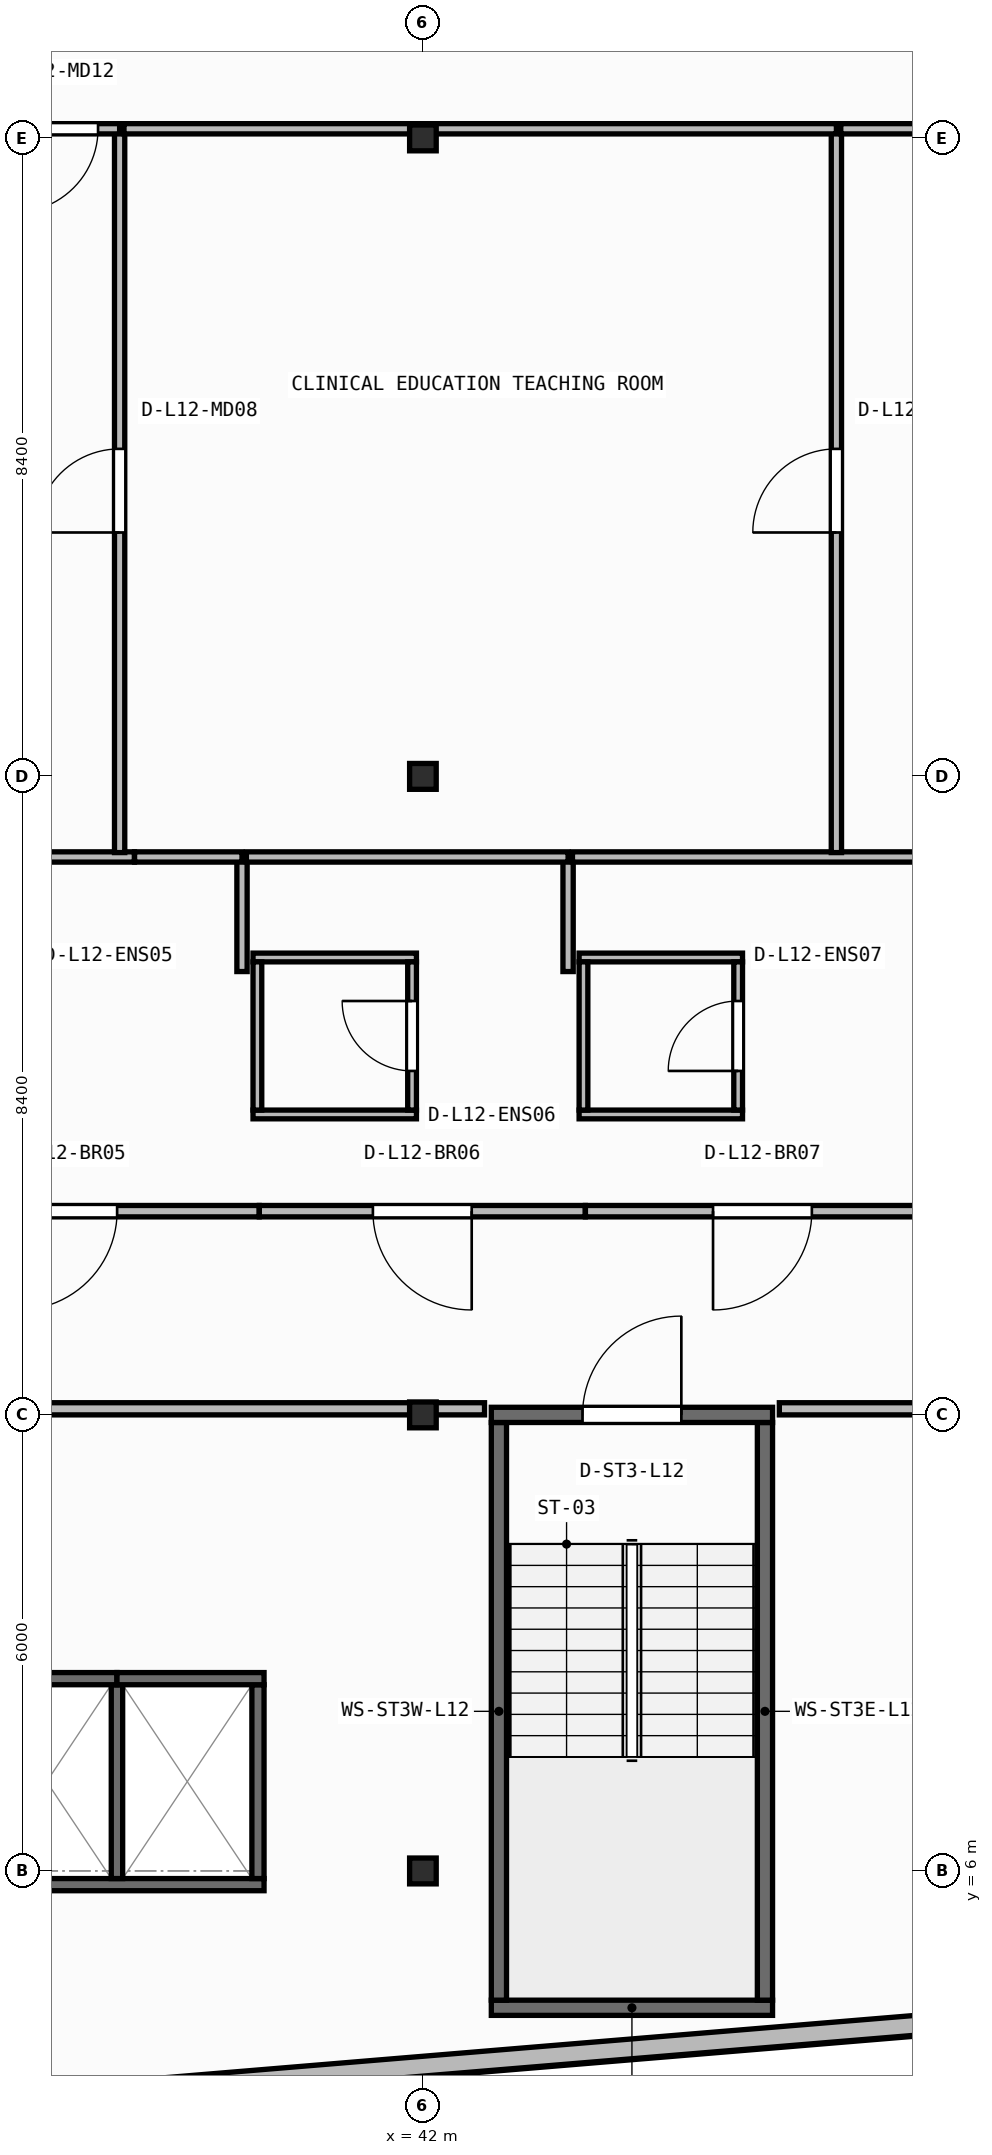
"""IFC4 building model, lengths in metres.
Left out: names, types, materials, properties, quantities, classifications, styles, units other than length and angle.
Written with IfcOpenShell. Run it as: python <this file> out.ifc"""

import sys

from ifc_helpers import new_model, si_unit, direction, frame, frame_2d, origin, origin_2d, place, context, subcontext, project, spatial, rectangle, i_section, extrude, element, fill, save


model = new_model("IFC4")
c1 = context("Model", 3, precision=1e-05, world=origin(), true_north=direction((0.0, 1.0)))
c2 = subcontext(c1, "Body", "Model", "MODEL_VIEW")
j1 = project(units=[si_unit("LENGTHUNIT", "METRE"), si_unit("PLANEANGLEUNIT", "RADIAN")], contexts=[c1])
p1 = place(None, origin())
s1 = spatial("IfcSite", under=j1, at=p1, CompositionType="ELEMENT")
p2 = place(p1, origin())
s2 = spatial("IfcBuilding", under=s1, at=p2, CompositionType="ELEMENT")
p3 = place(p2, frame((0.0, 0.0, 50.15)))
s3 = spatial("IfcBuildingStorey", under=s2, at=p3, CompositionType="ELEMENT", Elevation=50.15)
for number, where, z_axis, x_axis in (
    (1, (42.0, 6.0, 0.0), (0.0, 0.0, 1.0), (1.0, 0.0, 0.0)),
    (2, (42.0, 12.0, 0.0), (0.0, 0.0, 1.0), (1.0, 0.0, 0.0)),
    (3, (42.0, 20.4, 0.0), (0.0, 0.0, 1.0), (1.0, 0.0, 0.0)),
    (4, (42.0, 28.8, 0.0), (0.0, 0.0, 1.0), (1.0, 0.0, 0.0)),
):
    element("IfcColumn", number, at=place(p3, frame(where, z_axis=z_axis, x_axis=x_axis)), inside=s3, PredefinedType="COLUMN", context=c2, shape_type="SweptSolid", body=[
        extrude(i_section(OverallWidth=0.35, OverallDepth=0.34, WebThickness=0.016, FlangeThickness=0.028, at=origin_2d()), origin(), (0.0, 0.0, 1.0), 3.95),
    ])
p4 = place(p3, frame((2.76, 0.174, 0.0), z_axis=(0.0, 0.0, 1.0), x_axis=(0.996571478456, 0.082736257641, 0.0)))
e5 = element("IfcWall", 5, at=p4, inside=s3, PredefinedType="STANDARD", context=c2, shape_type="SweptSolid", body=[
    extrude(rectangle(XDim=52.861, YDim=0.26, at=frame_2d((26.431, 0.0))), origin(), (0.0, 0.0, 1.0), 3.71),
])
p5 = place(p4, frame((25.231, 0.0, 0.9)))
e6 = element("IfcOpeningElement", 6, at=p5, cuts=e5, PredefinedType="OPENING", context=c2, shape_type="SweptSolid", body=[
    extrude(rectangle(XDim=2.4, YDim=1.65, at=frame_2d((1.2, 0.825))), frame((0.0, 0.14, 0.0), z_axis=(0.0, -1.0, 0.0), x_axis=(1.0, 0.0, 0.0)), (0.0, 0.0, 1.0), 0.28),
])
p6 = place(p3, frame((42.9, 4.2, 0.0), z_axis=(0.0, 0.0, 1.0), x_axis=(1.0, 0.0, 0.0)))
e7 = element("IfcWall", 7, at=p6, inside=s3, PredefinedType="SHEAR", context=c2, shape_type="SweptSolid", body=[
    extrude(rectangle(XDim=3.7, YDim=0.2, at=frame_2d((1.85, 0.0))), origin(), (0.0, 0.0, 1.0), 3.71),
])
for number, where, z_axis, x_axis in (
    (8, (43.0, 4.3, 0.0), (0.0, 0.0, 1.0), (0.0, 1.0, 0.0)),
    (9, (46.5, 4.3, 0.0), (0.0, 0.0, 1.0), (0.0, 1.0, 0.0)),
):
    element("IfcWall", number, at=place(p3, frame(where, z_axis=z_axis, x_axis=x_axis)), inside=s3, PredefinedType="SHEAR", context=c2, shape_type="SweptSolid", body=[
        extrude(rectangle(XDim=7.6, YDim=0.2, at=frame_2d((3.8, 0.0))), origin(), (0.0, 0.0, 1.0), 3.71),
    ])
p7 = place(p3, frame((42.9, 12.0, 0.0), z_axis=(0.0, 0.0, 1.0), x_axis=(1.0, 0.0, 0.0)))
e10 = element("IfcWall", 10, at=p7, inside=s3, PredefinedType="SHEAR", context=c2, shape_type="SweptSolid", body=[
    extrude(rectangle(XDim=3.7, YDim=0.2, at=frame_2d((1.85, 0.0))), origin(), (0.0, 0.0, 1.0), 3.71),
])
p8 = place(p7, frame((1.2, 0.0, 0.0)))
e11 = element("IfcOpeningElement", 11, at=p8, cuts=e10, PredefinedType="OPENING", context=c2, shape_type="SweptSolid", body=[
    extrude(rectangle(XDim=1.3, YDim=2.15, at=frame_2d((0.65, 1.075))), frame((0.0, 0.11, 0.0), z_axis=(0.0, -1.0, 0.0), x_axis=(1.0, 0.0, 0.0)), (0.0, 0.0, 1.0), 0.22),
])
p9 = place(p3, frame((34.19, 5.82, 0.0), z_axis=(0.0, 0.0, 1.0), x_axis=(1.0, 0.0, 0.0)))
e12 = element("IfcWall", 12, at=p9, inside=s3, PredefinedType="SHEAR", context=c2, shape_type="SweptSolid", body=[
    extrude(rectangle(XDim=5.72, YDim=0.16, at=frame_2d((2.86, 0.0))), origin(), (0.0, 0.0, 1.0), 3.71),
])
p10 = place(p3, frame((39.83, 5.9, 0.0), z_axis=(0.0, 0.0, 1.0), x_axis=(0.0, 1.0, 0.0)))
e13 = element("IfcWall", 13, at=p10, inside=s3, PredefinedType="SHEAR", context=c2, shape_type="SweptSolid", body=[
    extrude(rectangle(XDim=2.55, YDim=0.16, at=frame_2d((1.275, 0.0))), origin(), (0.0, 0.0, 1.0), 3.71),
])
p11 = place(p3, frame((37.975, 5.9, 0.0), z_axis=(0.0, 0.0, 1.0), x_axis=(0.0, 1.0, 0.0)))
e14 = element("IfcWall", 14, at=p11, inside=s3, PredefinedType="SHEAR", context=c2, shape_type="SweptSolid", body=[
    extrude(rectangle(XDim=2.55, YDim=0.15, at=frame_2d((1.275, 0.0))), origin(), (0.0, 0.0, 1.0), 3.71),
])
p12 = place(p3, frame((36.125, 8.53, 0.0), z_axis=(0.0, 0.0, 1.0), x_axis=(1.0, 0.0, 0.0)))
e15 = element("IfcWall", 15, at=p12, inside=s3, PredefinedType="SHEAR", context=c2, shape_type="SweptSolid", body=[
    extrude(rectangle(XDim=1.85, YDim=0.16, at=frame_2d((0.925, 0.0))), origin(), (0.0, 0.0, 1.0), 3.71),
])
p13 = place(p3, frame((37.975, 8.53, 0.0), z_axis=(0.0, 0.0, 1.0), x_axis=(1.0, 0.0, 0.0)))
e16 = element("IfcWall", 16, at=p13, inside=s3, PredefinedType="SHEAR", context=c2, shape_type="SweptSolid", body=[
    extrude(rectangle(XDim=1.935, YDim=0.16, at=frame_2d((0.967, 0.0))), origin(), (0.0, 0.0, 1.0), 3.71),
])
p14 = place(p3, frame((39.765, 15.952, 0.0), z_axis=(0.0, 0.0, 1.0), x_axis=(1.0, 0.0, 0.0)))
e17 = element("IfcWall", 17, at=p14, inside=s3, PredefinedType="PARTITIONING", context=c2, shape_type="SweptSolid", body=[
    extrude(rectangle(XDim=2.15, YDim=0.115, at=frame_2d((1.075, 0.0))), origin(), (0.0, 0.0, 1.0), 3.329),
])
p15 = place(p3, frame((39.765, 18.018, 0.0), z_axis=(0.0, 0.0, 1.0), x_axis=(1.0, 0.0, 0.0)))
e18 = element("IfcWall", 18, at=p15, inside=s3, PredefinedType="PARTITIONING", context=c2, shape_type="SweptSolid", body=[
    extrude(rectangle(XDim=2.15, YDim=0.115, at=frame_2d((1.075, 0.0))), origin(), (0.0, 0.0, 1.0), 3.71),
])
p16 = place(p3, frame((39.823, 16.01, 0.0), z_axis=(0.0, 0.0, 1.0), x_axis=(0.0, 1.0, 0.0)))
e19 = element("IfcWall", 19, at=p16, inside=s3, PredefinedType="PARTITIONING", context=c2, shape_type="SweptSolid", body=[
    extrude(rectangle(XDim=1.95, YDim=0.115, at=frame_2d((0.975, 0.0))), origin(), (0.0, 0.0, 1.0), 3.71),
])
p17 = place(p3, frame((41.857, 16.01, 0.0), z_axis=(0.0, 0.0, 1.0), x_axis=(0.0, 1.0, 0.0)))
e20 = element("IfcWall", 20, at=p17, inside=s3, PredefinedType="PARTITIONING", context=c2, shape_type="SweptSolid", body=[
    extrude(rectangle(XDim=1.95, YDim=0.115, at=frame_2d((0.975, 0.0))), origin(), (0.0, 0.0, 1.0), 3.073),
])
p18 = place(p17, frame((0.515, 0.0, 0.0)))
e21 = element("IfcOpeningElement", 21, at=p18, cuts=e20, PredefinedType="OPENING", context=c2, shape_type="SweptSolid", body=[
    extrude(rectangle(XDim=0.92, YDim=2.1, at=frame_2d((0.46, 1.05))), frame((0.0, 0.067, 0.0), z_axis=(0.0, -1.0, 0.0), x_axis=(1.0, 0.0, 0.0)), (0.0, 0.0, 1.0), 0.135),
])
p19 = place(p3, frame((44.055, 15.952, 0.0), z_axis=(0.0, 0.0, 1.0), x_axis=(1.0, 0.0, 0.0)))
e22 = element("IfcWall", 22, at=p19, inside=s3, PredefinedType="PARTITIONING", context=c2, shape_type="SweptSolid", body=[
    extrude(rectangle(XDim=2.15, YDim=0.115, at=frame_2d((1.075, 0.0))), origin(), (0.0, 0.0, 1.0), 3.329),
])
p20 = place(p3, frame((44.055, 18.018, 0.0), z_axis=(0.0, 0.0, 1.0), x_axis=(1.0, 0.0, 0.0)))
e23 = element("IfcWall", 23, at=p20, inside=s3, PredefinedType="PARTITIONING", context=c2, shape_type="SweptSolid", body=[
    extrude(rectangle(XDim=2.15, YDim=0.115, at=frame_2d((1.075, 0.0))), origin(), (0.0, 0.0, 1.0), 3.71),
])
p21 = place(p3, frame((44.113, 16.01, 0.0), z_axis=(0.0, 0.0, 1.0), x_axis=(0.0, 1.0, 0.0)))
e24 = element("IfcWall", 24, at=p21, inside=s3, PredefinedType="PARTITIONING", context=c2, shape_type="SweptSolid", body=[
    extrude(rectangle(XDim=1.95, YDim=0.115, at=frame_2d((0.975, 0.0))), origin(), (0.0, 0.0, 1.0), 3.71),
])
p22 = place(p3, frame((46.147, 16.01, 0.0), z_axis=(0.0, 0.0, 1.0), x_axis=(0.0, 1.0, 0.0)))
e25 = element("IfcWall", 25, at=p22, inside=s3, PredefinedType="PARTITIONING", context=c2, shape_type="SweptSolid", body=[
    extrude(rectangle(XDim=1.95, YDim=0.115, at=frame_2d((0.975, 0.0))), origin(), (0.0, 0.0, 1.0), 3.71),
])
p23 = place(p22, frame((0.515, 0.0, 0.0)))
e26 = element("IfcOpeningElement", 26, at=p23, cuts=e25, PredefinedType="OPENING", context=c2, shape_type="SweptSolid", body=[
    extrude(rectangle(XDim=0.92, YDim=2.1, at=frame_2d((0.46, 1.05))), frame((0.0, 0.067, 0.0), z_axis=(0.0, -1.0, 0.0), x_axis=(1.0, 0.0, 0.0)), (0.0, 0.0, 1.0), 0.135),
])
p24 = place(p3, frame((39.846, 14.68, 0.0), z_axis=(0.0, 0.0, 1.0), x_axis=(-1.0, 0.0, 0.0)))
e27 = element("IfcWall", 27, at=p24, inside=s3, PredefinedType="PARTITIONING", context=c2, shape_type="SweptSolid", body=[
    extrude(rectangle(XDim=5.038, YDim=0.15, at=frame_2d((2.519, 0.0))), origin(), (0.0, 0.0, 1.0), 3.71),
])
p25 = place(p24, frame((1.869, 0.0, 0.0)))
e28 = element("IfcOpeningElement", 28, at=p25, cuts=e27, PredefinedType="OPENING", context=c2, shape_type="SweptSolid", body=[
    extrude(rectangle(XDim=1.3, YDim=2.15, at=frame_2d((0.65, 1.075))), frame((0.0, 0.085, 0.0), z_axis=(0.0, -1.0, 0.0), x_axis=(1.0, 0.0, 0.0)), (0.0, 0.0, 1.0), 0.17),
])
p26 = place(p3, frame((44.136, 14.68, 0.0), z_axis=(0.0, 0.0, 1.0), x_axis=(-1.0, 0.0, 0.0)))
e29 = element("IfcWall", 29, at=p26, inside=s3, PredefinedType="PARTITIONING", context=c2, shape_type="SweptSolid", body=[
    extrude(rectangle(XDim=4.288, YDim=0.15, at=frame_2d((2.144, 0.0))), origin(), (0.0, 0.0, 1.0), 3.71),
])
p27 = place(p26, frame((1.494, 0.0, 0.0)))
e30 = element("IfcOpeningElement", 30, at=p27, cuts=e29, PredefinedType="OPENING", context=c2, shape_type="SweptSolid", body=[
    extrude(rectangle(XDim=1.3, YDim=2.15, at=frame_2d((0.65, 1.075))), frame((0.0, 0.085, 0.0), z_axis=(0.0, -1.0, 0.0), x_axis=(1.0, 0.0, 0.0)), (0.0, 0.0, 1.0), 0.17),
])
p28 = place(p3, frame((48.796, 14.68, 0.0), z_axis=(0.0, 0.0, 1.0), x_axis=(-1.0, 0.0, 0.0)))
e31 = element("IfcWall", 31, at=p28, inside=s3, PredefinedType="PARTITIONING", context=c2, shape_type="SweptSolid", body=[
    extrude(rectangle(XDim=4.658, YDim=0.15, at=frame_2d((2.329, 0.0))), origin(), (0.0, 0.0, 1.0), 3.71),
])
p29 = place(p28, frame((1.679, 0.0, 0.0)))
e32 = element("IfcOpeningElement", 32, at=p29, cuts=e31, PredefinedType="OPENING", context=c2, shape_type="SweptSolid", body=[
    extrude(rectangle(XDim=1.3, YDim=2.15, at=frame_2d((0.65, 1.075))), frame((0.0, 0.085, 0.0), z_axis=(0.0, -1.0, 0.0), x_axis=(1.0, 0.0, 0.0)), (0.0, 0.0, 1.0), 0.17),
])
p30 = place(p3, frame((39.62, 17.833, 0.0), z_axis=(0.0, 0.0, 1.0), x_axis=(0.0, 1.0, 0.0)))
e33 = element("IfcWall", 33, at=p30, inside=s3, PredefinedType="PARTITIONING", context=c2, shape_type="SweptSolid", body=[
    extrude(rectangle(XDim=1.508, YDim=0.135, at=frame_2d((0.754, 0.0))), origin(), (0.0, 0.0, 1.0), 3.71),
])
p31 = place(p3, frame((38.205, 19.34, 0.0), z_axis=(0.0, 0.0, 1.0), x_axis=(-1.0, 0.0, 0.0)))
e34 = element("IfcWall", 34, at=p31, inside=s3, PredefinedType="PARTITIONING", context=c2, shape_type="SweptSolid", body=[
    extrude(rectangle(XDim=3.567, YDim=0.135, at=frame_2d((1.784, 0.0))), origin(), (0.0, 0.0, 1.0), 3.71),
])
p32 = place(p3, frame((39.62, 19.34, 0.0), z_axis=(0.0, 0.0, 1.0), x_axis=(-1.0, 0.0, 0.0)))
e35 = element("IfcWall", 35, at=p32, inside=s3, PredefinedType="PARTITIONING", context=c2, shape_type="SweptSolid", body=[
    extrude(rectangle(XDim=1.414, YDim=0.135, at=frame_2d((0.707, 0.0))), origin(), (0.0, 0.0, 1.0), 3.71),
])
p33 = place(p3, frame((43.91, 17.833, 0.0), z_axis=(0.0, 0.0, 1.0), x_axis=(0.0, 1.0, 0.0)))
e36 = element("IfcWall", 36, at=p33, inside=s3, PredefinedType="PARTITIONING", context=c2, shape_type="SweptSolid", body=[
    extrude(rectangle(XDim=1.508, YDim=0.135, at=frame_2d((0.754, 0.0))), origin(), (0.0, 0.0, 1.0), 3.71),
])
p34 = place(p3, frame((43.91, 19.34, 0.0), z_axis=(0.0, 0.0, 1.0), x_axis=(-1.0, 0.0, 0.0)))
e37 = element("IfcWall", 37, at=p34, inside=s3, PredefinedType="PARTITIONING", context=c2, shape_type="SweptSolid", body=[
    extrude(rectangle(XDim=4.232, YDim=0.135, at=frame_2d((2.116, 0.0))), origin(), (0.0, 0.0, 1.0), 3.71),
])
p35 = place(p3, frame((48.512, 19.34, 0.0), z_axis=(0.0, 0.0, 1.0), x_axis=(-1.0, 0.0, 0.0)))
e38 = element("IfcWall", 38, at=p35, inside=s3, PredefinedType="PARTITIONING", context=c2, shape_type="SweptSolid", body=[
    extrude(rectangle(XDim=4.545, YDim=0.135, at=frame_2d((2.272, 0.0))), origin(), (0.0, 0.0, 1.0), 3.71),
])
p36 = place(p3, frame((38.01, 19.397, 0.0), z_axis=(0.0, 0.0, 1.0), x_axis=(0.0, 1.0, 0.0)))
e39 = element("IfcWall", 39, at=p36, inside=s3, PredefinedType="PARTITIONING", context=c2, shape_type="SweptSolid", body=[
    extrude(rectangle(XDim=9.522, YDim=0.135, at=frame_2d((4.761, 0.0))), origin(), (0.0, 0.0, 1.0), 3.71),
])
p37 = place(p36, frame((4.211, 0.0, 0.0)))
e40 = element("IfcOpeningElement", 40, at=p37, cuts=e39, PredefinedType="OPENING", context=c2, shape_type="SweptSolid", body=[
    extrude(rectangle(XDim=1.1, YDim=2.1, at=frame_2d((0.55, 1.05))), frame((0.0, 0.077, 0.0), z_axis=(0.0, -1.0, 0.0), x_axis=(1.0, 0.0, 0.0)), (0.0, 0.0, 1.0), 0.155),
])
p38 = place(p3, frame((38.01, 28.92, 0.0), z_axis=(0.0, 0.0, 1.0), x_axis=(-1.0, 0.0, 0.0)))
e41 = element("IfcWall", 41, at=p38, inside=s3, PredefinedType="PARTITIONING", context=c2, shape_type="SweptSolid", body=[
    extrude(rectangle(XDim=4.858, YDim=0.135, at=frame_2d((2.429, 0.0))), origin(), (0.0, 0.0, 1.0), 3.279),
])
p39 = place(p38, frame((0.284, 0.0, 0.0)))
e42 = element("IfcOpeningElement", 42, at=p39, cuts=e41, PredefinedType="OPENING", context=c2, shape_type="SweptSolid", body=[
    extrude(rectangle(XDim=1.1, YDim=2.1, at=frame_2d((0.55, 1.05))), frame((0.0, 0.077, 0.0), z_axis=(0.0, -1.0, 0.0), x_axis=(1.0, 0.0, 0.0)), (0.0, 0.0, 1.0), 0.155),
])
p40 = place(p3, frame((47.44, 19.397, 0.0), z_axis=(0.0, 0.0, 1.0), x_axis=(0.0, 1.0, 0.0)))
e43 = element("IfcWall", 43, at=p40, inside=s3, PredefinedType="PARTITIONING", context=c2, shape_type="SweptSolid", body=[
    extrude(rectangle(XDim=9.522, YDim=0.135, at=frame_2d((4.761, 0.0))), origin(), (0.0, 0.0, 1.0), 3.71),
])
p41 = place(p40, frame((4.211, 0.0, 0.0)))
e44 = element("IfcOpeningElement", 44, at=p41, cuts=e43, PredefinedType="OPENING", context=c2, shape_type="SweptSolid", body=[
    extrude(rectangle(XDim=1.1, YDim=2.1, at=frame_2d((0.55, 1.05))), frame((0.0, 0.077, 0.0), z_axis=(0.0, -1.0, 0.0), x_axis=(1.0, 0.0, 0.0)), (0.0, 0.0, 1.0), 0.155),
])
p42 = place(p3, frame((47.44, 28.92, 0.0), z_axis=(0.0, 0.0, 1.0), x_axis=(-1.0, 0.0, 0.0)))
e45 = element("IfcWall", 45, at=p42, inside=s3, PredefinedType="PARTITIONING", context=c2, shape_type="SweptSolid", body=[
    extrude(rectangle(XDim=9.373, YDim=0.135, at=frame_2d((4.686, 0.0))), origin(), (0.0, 0.0, 1.0), 3.073),
])
p43 = place(p3, frame((52.0, 28.92, 0.0), z_axis=(0.0, 0.0, 1.0), x_axis=(-1.0, 0.0, 0.0)))
e46 = element("IfcWall", 46, at=p43, inside=s3, PredefinedType="PARTITIONING", context=c2, shape_type="SweptSolid", body=[
    extrude(rectangle(XDim=4.502, YDim=0.135, at=frame_2d((2.251, 0.0))), origin(), (0.0, 0.0, 1.0), 3.073),
])
p44 = place(p3, frame((31.63, 12.08, 0.0), z_axis=(0.0, 0.0, 1.0), x_axis=(1.0, 0.0, 0.0)))
e47 = element("IfcWall", 47, at=p44, inside=s3, PredefinedType="PARTITIONING", context=c2, shape_type="SweptSolid", body=[
    extrude(rectangle(XDim=11.181, YDim=0.16, at=frame_2d((5.59, 0.0))), origin(), (0.0, 0.0, 1.0), 3.073),
])
p45 = place(p3, frame((46.689, 12.08, 0.0), z_axis=(0.0, 0.0, 1.0), x_axis=(1.0, 0.0, 0.0)))
e48 = element("IfcWall", 48, at=p45, inside=s3, PredefinedType="PARTITIONING", context=c2, shape_type="SweptSolid", body=[
    extrude(rectangle(XDim=3.011, YDim=0.16, at=frame_2d((1.505, 0.0))), origin(), (0.0, 0.0, 1.0), 3.073),
])
p46 = place(p8, origin())
e49 = element("IfcDoor", 49, at=p46, inside=s3, OperationType="SINGLE_SWING_RIGHT", PredefinedType="DOOR", context=c2, shape_type="SweptSolid", body=[
    extrude(rectangle(XDim=1.3, YDim=2.15, at=frame_2d((0.65, 1.075))), frame((0.0, 0.025, 0.0), z_axis=(0.0, -1.0, 0.0), x_axis=(1.0, 0.0, 0.0)), (0.0, 0.0, 1.0), 0.05),
])
fill(e11, e49)
p47 = place(p18, origin())
e50 = element("IfcDoor", 50, at=p47, inside=s3, OperationType="SINGLE_SWING_RIGHT", PredefinedType="DOOR", context=c2, shape_type="SweptSolid", body=[
    extrude(rectangle(XDim=0.92, YDim=2.1, at=frame_2d((0.46, 1.05))), frame((0.0, 0.025, 0.0), z_axis=(0.0, -1.0, 0.0), x_axis=(1.0, 0.0, 0.0)), (0.0, 0.0, 1.0), 0.05),
])
fill(e21, e50)
p48 = place(p23, origin())
e51 = element("IfcDoor", 51, at=p48, inside=s3, OperationType="SINGLE_SWING_LEFT", PredefinedType="DOOR", context=c2, shape_type="SweptSolid", body=[
    extrude(rectangle(XDim=0.92, YDim=2.1, at=frame_2d((0.46, 1.05))), frame((0.0, 0.025, 0.0), z_axis=(0.0, -1.0, 0.0), x_axis=(1.0, 0.0, 0.0)), (0.0, 0.0, 1.0), 0.05),
])
fill(e26, e51)
p49 = place(p25, origin())
e52 = element("IfcDoor", 52, at=p49, inside=s3, OperationType="SINGLE_SWING_RIGHT", PredefinedType="DOOR", context=c2, shape_type="SweptSolid", body=[
    extrude(rectangle(XDim=1.3, YDim=2.15, at=frame_2d((0.65, 1.075))), frame((0.0, 0.025, 0.0), z_axis=(0.0, -1.0, 0.0), x_axis=(1.0, 0.0, 0.0)), (0.0, 0.0, 1.0), 0.05),
])
fill(e28, e52)
p50 = place(p27, origin())
e53 = element("IfcDoor", 53, at=p50, inside=s3, OperationType="SINGLE_SWING_LEFT", PredefinedType="DOOR", context=c2, shape_type="SweptSolid", body=[
    extrude(rectangle(XDim=1.3, YDim=2.15, at=frame_2d((0.65, 1.075))), frame((0.0, 0.025, 0.0), z_axis=(0.0, -1.0, 0.0), x_axis=(1.0, 0.0, 0.0)), (0.0, 0.0, 1.0), 0.05),
])
fill(e30, e53)
p51 = place(p29, origin())
e54 = element("IfcDoor", 54, at=p51, inside=s3, OperationType="SINGLE_SWING_RIGHT", PredefinedType="DOOR", context=c2, shape_type="SweptSolid", body=[
    extrude(rectangle(XDim=1.3, YDim=2.15, at=frame_2d((0.65, 1.075))), frame((0.0, 0.025, 0.0), z_axis=(0.0, -1.0, 0.0), x_axis=(1.0, 0.0, 0.0)), (0.0, 0.0, 1.0), 0.05),
])
fill(e32, e54)
p52 = place(p37, origin())
e55 = element("IfcDoor", 55, at=p52, inside=s3, OperationType="SINGLE_SWING_LEFT", PredefinedType="DOOR", context=c2, shape_type="SweptSolid", body=[
    extrude(rectangle(XDim=1.1, YDim=2.1, at=frame_2d((0.55, 1.05))), frame((0.0, 0.025, 0.0), z_axis=(0.0, -1.0, 0.0), x_axis=(1.0, 0.0, 0.0)), (0.0, 0.0, 1.0), 0.05),
])
fill(e40, e55)
p53 = place(p39, origin())
e56 = element("IfcDoor", 56, at=p53, inside=s3, OperationType="SINGLE_SWING_RIGHT", PredefinedType="DOOR", context=c2, shape_type="SweptSolid", body=[
    extrude(rectangle(XDim=1.1, YDim=2.1, at=frame_2d((0.55, 1.05))), frame((0.0, 0.025, 0.0), z_axis=(0.0, -1.0, 0.0), x_axis=(1.0, 0.0, 0.0)), (0.0, 0.0, 1.0), 0.05),
])
fill(e42, e56)
p54 = place(p41, origin())
e57 = element("IfcDoor", 57, at=p54, inside=s3, OperationType="SINGLE_SWING_LEFT", PredefinedType="DOOR", context=c2, shape_type="SweptSolid", body=[
    extrude(rectangle(XDim=1.1, YDim=2.1, at=frame_2d((0.55, 1.05))), frame((0.0, 0.025, 0.0), z_axis=(0.0, -1.0, 0.0), x_axis=(1.0, 0.0, 0.0)), (0.0, 0.0, 1.0), 0.05),
])
fill(e44, e57)
save(model, sys.argv[1])
